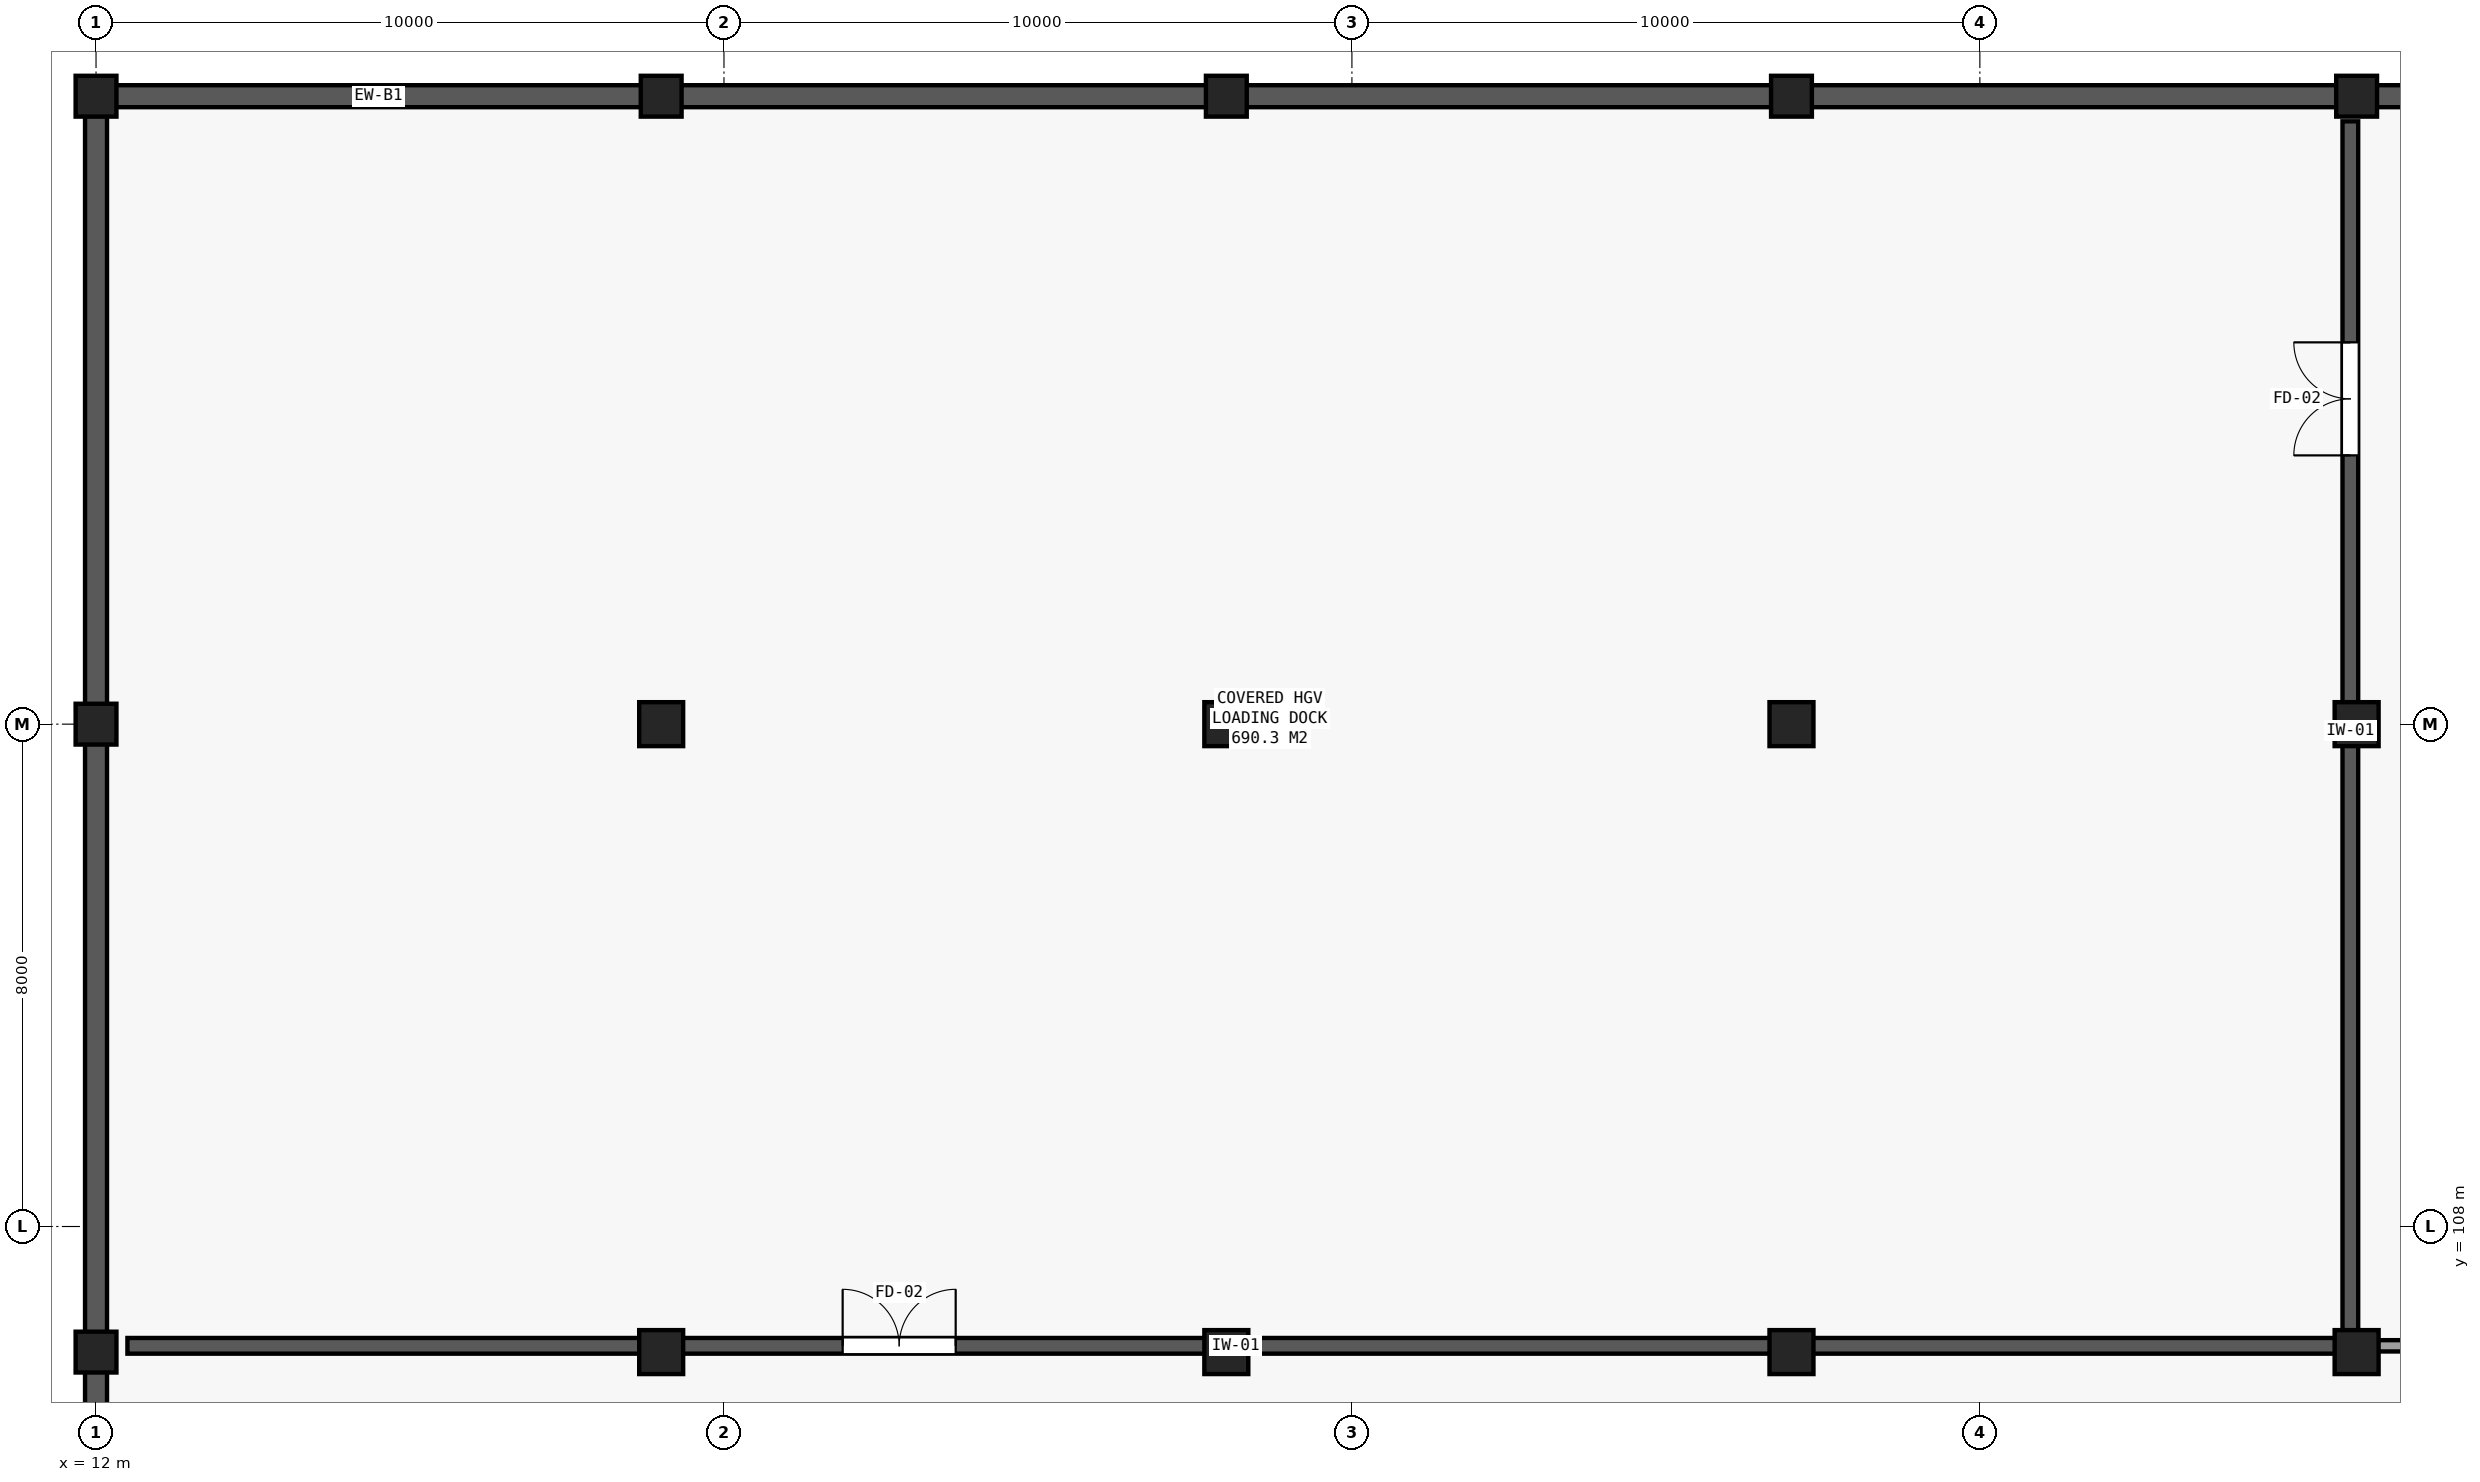
"""IFC4 building model, lengths in metres.
Left out: names, types, materials, properties, quantities, classifications, styles, units other than length and angle.
Written with IfcOpenShell. Run it as: python <this file> out.ifc"""

import sys

from ifc_helpers import new_model, si_unit, direction, frame, frame_2d, origin, origin_2d, place, context, subcontext, project, spatial, rectangle, extrude, element, fill, save


model = new_model("IFC4")
c1 = context("Model", 3, precision=1e-05, world=origin(), true_north=direction((0.0, 1.0)))
c2 = subcontext(c1, "Body", "Model", "MODEL_VIEW")
j1 = project(units=[si_unit("LENGTHUNIT", "METRE"), si_unit("PLANEANGLEUNIT", "RADIAN")], contexts=[c1])
p1 = place(None, origin())
s1 = spatial("IfcSite", under=j1, at=p1, CompositionType="ELEMENT")
p2 = place(p1, origin())
s2 = spatial("IfcBuilding", under=s1, at=p2, CompositionType="ELEMENT")
p3 = place(p2, frame((0.0, 0.0, -4.2)))
s3 = spatial("IfcBuildingStorey", under=s2, at=p3, CompositionType="ELEMENT", Elevation=-4.2)
for number, where, z_axis, x_axis in (
    (1, (12.0, 106.0, -0.4), (0.0, 0.0, 1.0), (1.0, 0.0, 0.0)),
    (2, (12.0, 116.0, -0.4), (0.0, 0.0, 1.0), (1.0, 0.0, 0.0)),
    (3, (12.0, 126.0, -0.4), (0.0, 0.0, 1.0), (1.0, 0.0, 0.0)),
):
    element("IfcColumn", number, at=place(p3, frame(where, z_axis=z_axis, x_axis=x_axis)), inside=s3, PredefinedType="COLUMN", context=c2, shape_type="SweptSolid", body=[
        extrude(rectangle(XDim=0.65, YDim=0.65, at=origin_2d()), origin(), (0.0, 0.0, 1.0), 4.6),
    ])
for number, where, z_axis, x_axis in (
    (4, (21.0, 106.0, -0.4), (0.0, 0.0, 1.0), (1.0, 0.0, 0.0)),
    (5, (21.0, 116.0, -0.4), (0.0, 0.0, 1.0), (1.0, 0.0, 0.0)),
):
    element("IfcColumn", number, at=place(p3, frame(where, z_axis=z_axis, x_axis=x_axis)), inside=s3, PredefinedType="COLUMN", context=c2, shape_type="SweptSolid", body=[
        extrude(rectangle(XDim=0.7, YDim=0.7, at=origin_2d()), origin(), (0.0, 0.0, 1.0), 4.6),
    ])
p4 = place(p3, frame((21.0, 126.0, -0.4), z_axis=(0.0, 0.0, 1.0), x_axis=(1.0, 0.0, 0.0)))
e6 = element("IfcColumn", 6, at=p4, inside=s3, PredefinedType="COLUMN", context=c2, shape_type="SweptSolid", body=[
    extrude(rectangle(XDim=0.65, YDim=0.65, at=origin_2d()), origin(), (0.0, 0.0, 1.0), 4.6),
])
for number, where, z_axis, x_axis in (
    (7, (30.0, 106.0, -0.4), (0.0, 0.0, 1.0), (1.0, 0.0, 0.0)),
    (8, (30.0, 116.0, -0.4), (0.0, 0.0, 1.0), (1.0, 0.0, 0.0)),
):
    element("IfcColumn", number, at=place(p3, frame(where, z_axis=z_axis, x_axis=x_axis)), inside=s3, PredefinedType="COLUMN", context=c2, shape_type="SweptSolid", body=[
        extrude(rectangle(XDim=0.7, YDim=0.7, at=origin_2d()), origin(), (0.0, 0.0, 1.0), 4.6),
    ])
p5 = place(p3, frame((30.0, 126.0, -0.4), z_axis=(0.0, 0.0, 1.0), x_axis=(1.0, 0.0, 0.0)))
e9 = element("IfcColumn", 9, at=p5, inside=s3, PredefinedType="COLUMN", context=c2, shape_type="SweptSolid", body=[
    extrude(rectangle(XDim=0.65, YDim=0.65, at=origin_2d()), origin(), (0.0, 0.0, 1.0), 4.6),
])
for number, where, z_axis, x_axis in (
    (10, (39.0, 106.0, -0.4), (0.0, 0.0, 1.0), (1.0, 0.0, 0.0)),
    (11, (39.0, 116.0, -0.4), (0.0, 0.0, 1.0), (1.0, 0.0, 0.0)),
):
    element("IfcColumn", number, at=place(p3, frame(where, z_axis=z_axis, x_axis=x_axis)), inside=s3, PredefinedType="COLUMN", context=c2, shape_type="SweptSolid", body=[
        extrude(rectangle(XDim=0.7, YDim=0.7, at=origin_2d()), origin(), (0.0, 0.0, 1.0), 4.6),
    ])
p6 = place(p3, frame((39.0, 126.0, -0.4), z_axis=(0.0, 0.0, 1.0), x_axis=(1.0, 0.0, 0.0)))
e12 = element("IfcColumn", 12, at=p6, inside=s3, PredefinedType="COLUMN", context=c2, shape_type="SweptSolid", body=[
    extrude(rectangle(XDim=0.65, YDim=0.65, at=origin_2d()), origin(), (0.0, 0.0, 1.0), 4.6),
])
for number, where, z_axis, x_axis in (
    (13, (48.0, 106.0, -0.4), (0.0, 0.0, 1.0), (1.0, 0.0, 0.0)),
    (14, (48.0, 116.0, -0.4), (0.0, 0.0, 1.0), (1.0, 0.0, 0.0)),
):
    element("IfcColumn", number, at=place(p3, frame(where, z_axis=z_axis, x_axis=x_axis)), inside=s3, PredefinedType="COLUMN", context=c2, shape_type="SweptSolid", body=[
        extrude(rectangle(XDim=0.7, YDim=0.7, at=origin_2d()), origin(), (0.0, 0.0, 1.0), 4.6),
    ])
p7 = place(p3, frame((48.0, 126.0, -0.4), z_axis=(0.0, 0.0, 1.0), x_axis=(1.0, 0.0, 0.0)))
e15 = element("IfcColumn", 15, at=p7, inside=s3, PredefinedType="COLUMN", context=c2, shape_type="SweptSolid", body=[
    extrude(rectangle(XDim=0.65, YDim=0.65, at=origin_2d()), origin(), (0.0, 0.0, 1.0), 4.6),
])
for number, where, z_axis, x_axis in (
    (16, (12.0, 126.0, 0.0), (0.0, 0.0, 1.0), (1.0, 0.0, 0.0)),
    (17, (21.0, 126.0, 0.0), (0.0, 0.0, 1.0), (1.0, 0.0, 0.0)),
    (18, (30.0, 126.0, 0.0), (0.0, 0.0, 1.0), (1.0, 0.0, 0.0)),
    (19, (39.0, 126.0, 0.0), (0.0, 0.0, 1.0), (1.0, 0.0, 0.0)),
    (20, (48.0, 126.0, 0.0), (0.0, 0.0, 1.0), (1.0, 0.0, 0.0)),
):
    element("IfcWall", number, at=place(p3, frame(where, z_axis=z_axis, x_axis=x_axis)), inside=s3, PredefinedType="SOLIDWALL", context=c2, shape_type="SweptSolid", body=[
        extrude(rectangle(XDim=9.0, YDim=0.35, at=frame_2d((4.5, 0.0))), origin(), (0.0, 0.0, 1.0), 3.84),
    ])
for number, where, z_axis, x_axis in (
    (21, (12.0, 96.0, 0.0), (0.0, 0.0, 1.0), (0.0, 1.0, 0.0)),
    (22, (12.0, 106.0, 0.0), (0.0, 0.0, 1.0), (0.0, 1.0, 0.0)),
    (23, (12.0, 116.0, 0.0), (0.0, 0.0, 1.0), (0.0, 1.0, 0.0)),
):
    element("IfcWall", number, at=place(p3, frame(where, z_axis=z_axis, x_axis=x_axis)), inside=s3, PredefinedType="SOLIDWALL", context=c2, shape_type="SweptSolid", body=[
        extrude(rectangle(XDim=10.0, YDim=0.35, at=frame_2d((5.0, 0.0))), origin(), (0.0, 0.0, 1.0), 3.84),
    ])
p8 = place(p3, frame((12.5, 106.1, 0.0), z_axis=(0.0, 0.0, 1.0), x_axis=(1.0, 0.0, 0.0)))
e24 = element("IfcWall", 24, at=p8, inside=s3, PredefinedType="SOLIDWALL", context=c2, shape_type="SweptSolid", body=[
    extrude(rectangle(XDim=35.3, YDim=0.25, at=frame_2d((17.65, 0.0))), origin(), (0.0, 0.0, 1.0), 3.8),
])
p9 = place(p8, frame((11.39, 0.0, 0.0)))
e25 = element("IfcOpeningElement", 25, at=p9, cuts=e24, PredefinedType="OPENING", context=c2, shape_type="SweptSolid", body=[
    extrude(rectangle(XDim=1.8, YDim=2.2, at=frame_2d((0.9, 1.1))), frame((0.0, 0.135, 0.0), z_axis=(0.0, -1.0, 0.0), x_axis=(1.0, 0.0, 0.0)), (0.0, 0.0, 1.0), 0.27),
])
p10 = place(p3, frame((48.2, 106.1, 0.0), z_axis=(0.0, 0.0, 1.0), x_axis=(1.0, 0.0, 0.0)))
e26 = element("IfcWall", 26, at=p10, inside=s3, PredefinedType="PARTITIONING", context=c2, shape_type="SweptSolid", body=[
    extrude(rectangle(XDim=26.6, YDim=0.18, at=frame_2d((13.3, 0.0))), origin(), (0.0, 0.0, 1.0), 2.94),
])
p11 = place(p10, frame((12.55, 0.0, 0.0)))
e27 = element("IfcOpeningElement", 27, at=p11, cuts=e26, PredefinedType="OPENING", context=c2, shape_type="SweptSolid", body=[
    extrude(rectangle(XDim=1.5, YDim=2.25, at=frame_2d((0.75, 1.125))), frame((0.0, 0.1, 0.0), z_axis=(0.0, -1.0, 0.0), x_axis=(1.0, 0.0, 0.0)), (0.0, 0.0, 1.0), 0.2),
])
p12 = place(p3, frame((47.9, 106.2, 0.0), z_axis=(0.0, 0.0, 1.0), x_axis=(0.0, 1.0, 0.0)))
e28 = element("IfcWall", 28, at=p12, inside=s3, PredefinedType="SOLIDWALL", context=c2, shape_type="SweptSolid", body=[
    extrude(rectangle(XDim=19.4, YDim=0.25, at=frame_2d((9.7, 0.0))), origin(), (0.0, 0.0, 1.0), 3.8),
])
p13 = place(p12, frame((14.08, 0.0, 0.0)))
e29 = element("IfcOpeningElement", 29, at=p13, cuts=e28, PredefinedType="OPENING", context=c2, shape_type="SweptSolid", body=[
    extrude(rectangle(XDim=1.8, YDim=2.2, at=frame_2d((0.9, 1.1))), frame((0.0, 0.135, 0.0), z_axis=(0.0, -1.0, 0.0), x_axis=(1.0, 0.0, 0.0)), (0.0, 0.0, 1.0), 0.27),
])
p14 = place(p9, origin())
e30 = element("IfcDoor", 30, at=p14, inside=s3, OperationType="DOUBLE_DOOR_SINGLE_SWING", PredefinedType="DOOR", context=c2, shape_type="SweptSolid", body=[
    extrude(rectangle(XDim=1.8, YDim=2.2, at=frame_2d((0.9, 1.1))), frame((0.0, 0.025, 0.0), z_axis=(0.0, -1.0, 0.0), x_axis=(1.0, 0.0, 0.0)), (0.0, 0.0, 1.0), 0.05),
])
fill(e25, e30)
p15 = place(p13, origin())
e31 = element("IfcDoor", 31, at=p15, inside=s3, OperationType="DOUBLE_DOOR_SINGLE_SWING", PredefinedType="DOOR", context=c2, shape_type="SweptSolid", body=[
    extrude(rectangle(XDim=1.8, YDim=2.2, at=frame_2d((0.9, 1.1))), frame((0.0, 0.025, 0.0), z_axis=(0.0, -1.0, 0.0), x_axis=(1.0, 0.0, 0.0)), (0.0, 0.0, 1.0), 0.05),
])
fill(e29, e31)
save(model, sys.argv[1])
